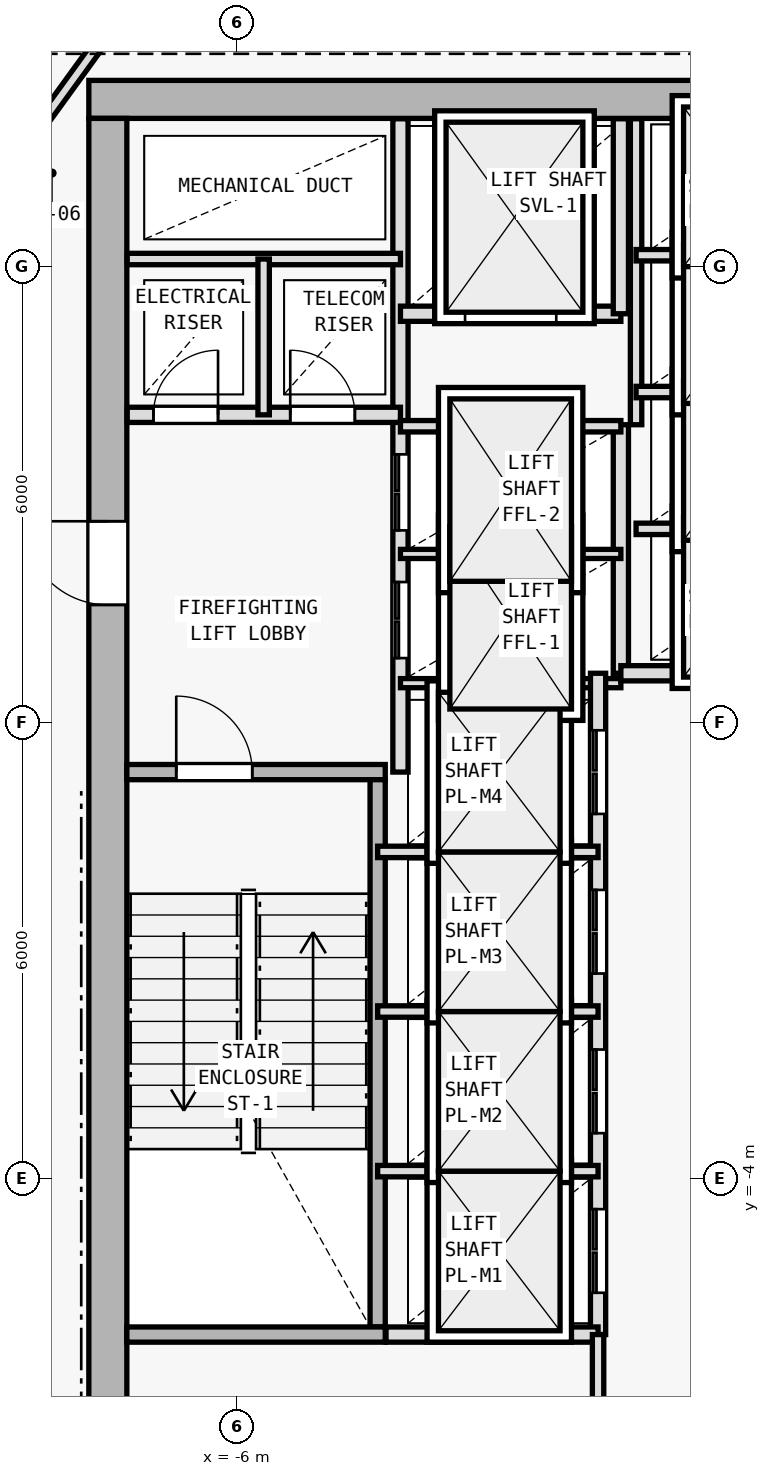
"""IFC4 building model, lengths in metres.
Left out: names, types, materials, properties, quantities, classifications, styles, units other than length and angle.
Written with IfcOpenShell. Run it as: python <this file> out.ifc"""

import sys

from ifc_helpers import new_model, si_unit, direction, frame, frame_2d, origin, origin_2d, place, context, subcontext, project, spatial, rectangle, i_section, extrude, element, fill, save


model = new_model("IFC4")
c1 = context("Model", 3, precision=1e-05, world=origin(), true_north=direction((0.0, 1.0)))
c2 = subcontext(c1, "Body", "Model", "MODEL_VIEW")
j1 = project(units=[si_unit("LENGTHUNIT", "METRE"), si_unit("PLANEANGLEUNIT", "RADIAN")], contexts=[c1])
p1 = place(None, origin())
s1 = spatial("IfcSite", under=j1, at=p1, CompositionType="ELEMENT")
p2 = place(p1, origin())
s2 = spatial("IfcBuilding", under=s1, at=p2, CompositionType="ELEMENT")
p3 = place(p2, frame((0.0, 0.0, 190.2)))
s3 = spatial("IfcBuildingStorey", under=s2, at=p3, CompositionType="ELEMENT", Elevation=190.2)
for number, where, z_axis, x_axis in (
    (1, (-7.7, 10.2, 0.0), (0.0, 0.0, 1.0), (1.0, 0.0, 0.0)),
    (2, (-7.7, 2.0, 0.0), (0.0, 0.0, 1.0), (1.0, 0.0, 0.0)),
):
    element("IfcColumn", number, at=place(p3, frame(where, z_axis=z_axis, x_axis=x_axis)), inside=s3, PredefinedType="COLUMN", context=c2, shape_type="SweptSolid", body=[
        extrude(i_section(OverallWidth=0.404, OverallDepth=0.407, WebThickness=0.017, FlangeThickness=0.028, FilletRadius=0.015, at=origin_2d()), origin(), (0.0, 0.0, 1.0), 4.5),
    ])
p4 = place(p3, frame((7.95, 10.2, 0.0), z_axis=(0.0, 0.0, 1.0), x_axis=(-1.0, 0.0, 0.0)))
e3 = element("IfcWall", 3, at=p4, inside=s3, PredefinedType="SHEAR", context=c2, shape_type="SweptSolid", body=[
    extrude(rectangle(XDim=15.9, YDim=0.5, at=frame_2d((7.95, 0.0))), origin(), (0.0, 0.0, 1.0), 4.25),
])
p5 = place(p4, frame((4.4, 0.0, 0.0)))
e4 = element("IfcOpeningElement", 4, at=p5, cuts=e3, PredefinedType="OPENING", context=c2, shape_type="SweptSolid", body=[
    extrude(rectangle(XDim=1.1, YDim=2.15, at=frame_2d((0.55, 1.075))), frame((0.0, 0.26, 0.0), z_axis=(0.0, -1.0, 0.0), x_axis=(1.0, 0.0, 0.0)), (0.0, 0.0, 1.0), 0.52),
])
p6 = place(p3, frame((-7.7, -9.15, 0.0), z_axis=(0.0, 0.0, 1.0), x_axis=(0.0, 1.0, 0.0)))
e5 = element("IfcWall", 5, at=p6, inside=s3, PredefinedType="SHEAR", context=c2, shape_type="SweptSolid", body=[
    extrude(rectangle(XDim=19.1, YDim=0.5, at=frame_2d((9.55, 0.0))), origin(), (0.0, 0.0, 1.0), 4.25),
])
p7 = place(p6, frame((12.7, 0.0, 0.0)))
e6 = element("IfcOpeningElement", 6, at=p7, cuts=e5, PredefinedType="OPENING", context=c2, shape_type="SweptSolid", body=[
    extrude(rectangle(XDim=1.1, YDim=2.15, at=frame_2d((0.55, 1.075))), frame((0.0, 0.26, 0.0), z_axis=(0.0, -1.0, 0.0), x_axis=(1.0, 0.0, 0.0)), (0.0, 0.0, 1.0), 0.52),
])
p8 = place(p3, frame((-7.45, 1.35, 0.0), z_axis=(0.0, 0.0, 1.0), x_axis=(1.0, 0.0, 0.0)))
e7 = element("IfcWall", 7, at=p8, inside=s3, PredefinedType="SOLIDWALL", context=c2, shape_type="SweptSolid", body=[
    extrude(rectangle(XDim=3.4, YDim=0.2, at=frame_2d((1.7, 0.0))), origin(), (0.0, 0.0, 1.0), 4.25),
])
p9 = place(p8, frame((0.65, 0.0, 0.0)))
e8 = element("IfcOpeningElement", 8, at=p9, cuts=e7, PredefinedType="OPENING", context=c2, shape_type="SweptSolid", body=[
    extrude(rectangle(XDim=1.0, YDim=2.15, at=frame_2d((0.5, 1.075))), frame((0.0, 0.11, 0.0), z_axis=(0.0, -1.0, 0.0), x_axis=(1.0, 0.0, 0.0)), (0.0, 0.0, 1.0), 0.22),
])
p10 = place(p3, frame((-4.15, -5.95, 0.0), z_axis=(0.0, 0.0, 1.0), x_axis=(0.0, 1.0, 0.0)))
e9 = element("IfcWall", 9, at=p10, inside=s3, PredefinedType="SOLIDWALL", context=c2, shape_type="SweptSolid", body=[
    extrude(rectangle(XDim=7.2, YDim=0.2, at=frame_2d((3.6, 0.0))), origin(), (0.0, 0.0, 1.0), 4.25),
])
p11 = place(p3, frame((-3.85, 1.35, 0.0), z_axis=(0.0, 0.0, 1.0), x_axis=(0.0, 1.0, 0.0)))
e10 = element("IfcWall", 10, at=p11, inside=s3, PredefinedType="SOLIDWALL", context=c2, shape_type="SweptSolid", body=[
    extrude(rectangle(XDim=8.595, YDim=0.2, at=frame_2d((4.297, 0.0))), origin(), (0.0, 0.0, 1.0), 4.25),
])
p12 = place(p11, frame((1.5, 0.0, 0.0)))
e11 = element("IfcOpeningElement", 11, at=p12, cuts=e10, PredefinedType="OPENING", context=c2, shape_type="SweptSolid", body=[
    extrude(rectangle(XDim=1.0, YDim=2.15, at=frame_2d((0.5, 1.075))), frame((0.0, 0.11, 0.0), z_axis=(0.0, -1.0, 0.0), x_axis=(1.0, 0.0, 0.0)), (0.0, 0.0, 1.0), 0.22),
])
p13 = place(p11, frame((3.18, 0.0, 0.0)))
e12 = element("IfcOpeningElement", 12, at=p13, cuts=e10, PredefinedType="OPENING", context=c2, shape_type="SweptSolid", body=[
    extrude(rectangle(XDim=1.0, YDim=2.15, at=frame_2d((0.5, 1.075))), frame((0.0, 0.11, 0.0), z_axis=(0.0, -1.0, 0.0), x_axis=(1.0, 0.0, 0.0)), (0.0, 0.0, 1.0), 0.22),
])
p14 = place(p3, frame((-7.445, 6.05, 0.0), z_axis=(0.0, 0.0, 1.0), x_axis=(1.0, 0.0, 0.0)))
e13 = element("IfcWall", 13, at=p14, inside=s3, PredefinedType="SOLIDWALL", context=c2, shape_type="SweptSolid", body=[
    extrude(rectangle(XDim=3.595, YDim=0.2, at=frame_2d((1.797, 0.0))), origin(), (0.0, 0.0, 1.0), 4.25),
])
p15 = place(p14, frame((0.345, 0.0, 0.0)))
e14 = element("IfcOpeningElement", 14, at=p15, cuts=e13, PredefinedType="OPENING", context=c2, shape_type="SweptSolid", body=[
    extrude(rectangle(XDim=0.85, YDim=2.1, at=frame_2d((0.425, 1.05))), frame((0.0, 0.11, 0.0), z_axis=(0.0, -1.0, 0.0), x_axis=(1.0, 0.0, 0.0)), (0.0, 0.0, 1.0), 0.22),
])
p16 = place(p14, frame((2.145, 0.0, 0.0)))
e15 = element("IfcOpeningElement", 15, at=p16, cuts=e13, PredefinedType="OPENING", context=c2, shape_type="SweptSolid", body=[
    extrude(rectangle(XDim=0.85, YDim=2.1, at=frame_2d((0.425, 1.05))), frame((0.0, 0.11, 0.0), z_axis=(0.0, -1.0, 0.0), x_axis=(1.0, 0.0, 0.0)), (0.0, 0.0, 1.0), 0.22),
])
p17 = place(p3, frame((-7.445, 8.1, 0.0), z_axis=(0.0, 0.0, 1.0), x_axis=(1.0, 0.0, 0.0)))
e16 = element("IfcWall", 16, at=p17, inside=s3, PredefinedType="PARTITIONING", context=c2, shape_type="SweptSolid", body=[
    extrude(rectangle(XDim=3.595, YDim=0.15, at=frame_2d((1.797, 0.0))), origin(), (0.0, 0.0, 1.0), 4.25),
])
p18 = place(p3, frame((-5.65, 6.05, 0.0), z_axis=(0.0, 0.0, 1.0), x_axis=(0.0, 1.0, 0.0)))
e17 = element("IfcWall", 17, at=p18, inside=s3, PredefinedType="PARTITIONING", context=c2, shape_type="SweptSolid", body=[
    extrude(rectangle(XDim=2.05, YDim=0.15, at=frame_2d((1.025, 0.0))), origin(), (0.0, 0.0, 1.0), 4.25),
])
p19 = place(p3, frame((-0.95, 2.65, 0.0), z_axis=(0.0, 0.0, 1.0), x_axis=(0.0, 1.0, 0.0)))
e18 = element("IfcWall", 18, at=p19, inside=s3, PredefinedType="SOLIDWALL", context=c2, shape_type="SweptSolid", body=[
    extrude(rectangle(XDim=3.27, YDim=0.2, at=frame_2d((1.635, 0.0))), origin(), (0.0, 0.0, 1.0), 4.25),
])
for number, where, z_axis, x_axis in (
    (19, (-3.85, 2.52, 0.0), (0.0, 0.0, 1.0), (1.0, 0.0, 0.0)),
    (20, (-3.85, 4.22, 0.0), (0.0, 0.0, 1.0), (1.0, 0.0, 0.0)),
):
    element("IfcWall", number, at=place(p3, frame(where, z_axis=z_axis, x_axis=x_axis)), inside=s3, PredefinedType="PARTITIONING", context=c2, shape_type="SweptSolid", body=[
        extrude(rectangle(XDim=2.9, YDim=0.12, at=frame_2d((1.45, 0.0))), origin(), (0.0, 0.0, 1.0), 4.25),
    ])
p20 = place(p3, frame((-3.85, 5.9, 0.0), z_axis=(0.0, 0.0, 1.0), x_axis=(1.0, 0.0, 0.0)))
e21 = element("IfcWall", 21, at=p20, inside=s3, PredefinedType="PARTITIONING", context=c2, shape_type="SweptSolid", body=[
    extrude(rectangle(XDim=2.9, YDim=0.15, at=frame_2d((1.45, 0.0))), origin(), (0.0, 0.0, 1.0), 4.25),
])
p21 = place(p3, frame((-3.85, 7.38, 0.0), z_axis=(0.0, 0.0, 1.0), x_axis=(1.0, 0.0, 0.0)))
e22 = element("IfcWall", 22, at=p21, inside=s3, PredefinedType="SOLIDWALL", context=c2, shape_type="SweptSolid", body=[
    extrude(rectangle(XDim=2.9, YDim=0.2, at=frame_2d((1.45, 0.0))), origin(), (0.0, 0.0, 1.0), 4.25),
])
p22 = place(p21, frame((0.85, 0.0, 0.0)))
e23 = element("IfcOpeningElement", 23, at=p22, cuts=e22, PredefinedType="OPENING", context=c2, shape_type="SweptSolid", body=[
    extrude(rectangle(XDim=1.2, YDim=2.2, at=frame_2d((0.6, 1.1))), frame((0.0, 0.11, 0.0), z_axis=(0.0, -1.0, 0.0), x_axis=(1.0, 0.0, 0.0)), (0.0, 0.0, 1.0), 0.22),
])
p23 = place(p3, frame((-0.95, 7.38, 0.0), z_axis=(0.0, 0.0, 1.0), x_axis=(0.0, 1.0, 0.0)))
e24 = element("IfcWall", 24, at=p23, inside=s3, PredefinedType="SOLIDWALL", context=c2, shape_type="SweptSolid", body=[
    extrude(rectangle(XDim=2.565, YDim=0.2, at=frame_2d((1.283, 0.0))), origin(), (0.0, 0.0, 1.0), 4.25),
])
p24 = place(p3, frame((-1.25, -6.05, 0.0), z_axis=(0.0, 0.0, 1.0), x_axis=(0.0, 1.0, 0.0)))
e25 = element("IfcWall", 25, at=p24, inside=s3, PredefinedType="SOLIDWALL", context=c2, shape_type="SweptSolid", body=[
    extrude(rectangle(XDim=8.7, YDim=0.2, at=frame_2d((4.35, 0.0))), origin(), (0.0, 0.0, 1.0), 4.25),
])
p25 = place(p24, frame((0.55, 0.0, 0.0)))
e26 = element("IfcOpeningElement", 26, at=p25, cuts=e25, PredefinedType="OPENING", context=c2, shape_type="SweptSolid", body=[
    extrude(rectangle(XDim=1.1, YDim=2.15, at=frame_2d((0.55, 1.075))), frame((0.0, 0.11, 0.0), z_axis=(0.0, -1.0, 0.0), x_axis=(1.0, 0.0, 0.0)), (0.0, 0.0, 1.0), 0.22),
])
p26 = place(p24, frame((2.65, 0.0, 0.0)))
e27 = element("IfcOpeningElement", 27, at=p26, cuts=e25, PredefinedType="OPENING", context=c2, shape_type="SweptSolid", body=[
    extrude(rectangle(XDim=1.1, YDim=2.15, at=frame_2d((0.55, 1.075))), frame((0.0, 0.11, 0.0), z_axis=(0.0, -1.0, 0.0), x_axis=(1.0, 0.0, 0.0)), (0.0, 0.0, 1.0), 0.22),
])
p27 = place(p24, frame((4.75, 0.0, 0.0)))
e28 = element("IfcOpeningElement", 28, at=p27, cuts=e25, PredefinedType="OPENING", context=c2, shape_type="SweptSolid", body=[
    extrude(rectangle(XDim=1.1, YDim=2.15, at=frame_2d((0.55, 1.075))), frame((0.0, 0.11, 0.0), z_axis=(0.0, -1.0, 0.0), x_axis=(1.0, 0.0, 0.0)), (0.0, 0.0, 1.0), 0.22),
])
p28 = place(p24, frame((6.85, 0.0, 0.0)))
e29 = element("IfcOpeningElement", 29, at=p28, cuts=e25, PredefinedType="OPENING", context=c2, shape_type="SweptSolid", body=[
    extrude(rectangle(XDim=1.1, YDim=2.15, at=frame_2d((0.55, 1.075))), frame((0.0, 0.11, 0.0), z_axis=(0.0, -1.0, 0.0), x_axis=(1.0, 0.0, 0.0)), (0.0, 0.0, 1.0), 0.22),
])
for number, where, z_axis, x_axis in (
    (30, (-4.15, -3.9, 0.0), (0.0, 0.0, 1.0), (1.0, 0.0, 0.0)),
    (31, (-4.15, -1.8, 0.0), (0.0, 0.0, 1.0), (1.0, 0.0, 0.0)),
    (32, (-4.15, 0.3, 0.0), (0.0, 0.0, 1.0), (1.0, 0.0, 0.0)),
):
    element("IfcWall", number, at=place(p3, frame(where, z_axis=z_axis, x_axis=x_axis)), inside=s3, PredefinedType="PARTITIONING", context=c2, shape_type="SweptSolid", body=[
        extrude(rectangle(XDim=2.9, YDim=0.15, at=frame_2d((1.45, 0.0))), origin(), (0.0, 0.0, 1.0), 4.25),
    ])
p29 = place(p3, frame((-0.95, 2.65, 0.0), z_axis=(0.0, 0.0, 1.0), x_axis=(1.0, 0.0, 0.0)))
e33 = element("IfcWall", 33, at=p29, inside=s3, PredefinedType="SOLIDWALL", context=c2, shape_type="SweptSolid", body=[
    extrude(rectangle(XDim=2.9, YDim=0.2, at=frame_2d((1.45, 0.0))), origin(), (0.0, 0.0, 1.0), 4.25),
])
p30 = place(p3, frame((-0.75, 5.92, 0.0), z_axis=(0.0, 0.0, 1.0), x_axis=(0.0, 1.0, 0.0)))
e34 = element("IfcWall", 34, at=p30, inside=s3, PredefinedType="PARTITIONING", context=c2, shape_type="SweptSolid", body=[
    extrude(rectangle(XDim=4.025, YDim=0.15, at=frame_2d((2.013, 0.0))), origin(), (0.0, 0.0, 1.0), 4.25),
])
for number, where, z_axis, x_axis in (
    (35, (-0.75, 4.55, 0.0), (0.0, 0.0, 1.0), (1.0, 0.0, 0.0)),
    (36, (-0.75, 6.35, 0.0), (0.0, 0.0, 1.0), (1.0, 0.0, 0.0)),
    (37, (-0.75, 8.15, 0.0), (0.0, 0.0, 1.0), (1.0, 0.0, 0.0)),
):
    element("IfcWall", number, at=place(p3, frame(where, z_axis=z_axis, x_axis=x_axis)), inside=s3, PredefinedType="PARTITIONING", context=c2, shape_type="SweptSolid", body=[
        extrude(rectangle(XDim=2.7, YDim=0.15, at=frame_2d((1.35, 0.0))), origin(), (0.0, 0.0, 1.0), 4.25),
    ])
p31 = place(p3, frame((-7.45, -6.05, 0.0), z_axis=(0.0, 0.0, 1.0), x_axis=(1.0, 0.0, 0.0)))
e38 = element("IfcWall", 38, at=p31, inside=s3, PredefinedType="SOLIDWALL", context=c2, shape_type="SweptSolid", body=[
    extrude(rectangle(XDim=3.4, YDim=0.2, at=frame_2d((1.7, 0.0))), origin(), (0.0, 0.0, 1.0), 4.25),
])
p32 = place(p3, frame((-4.04, -6.05, 0.0), z_axis=(0.0, 0.0, 1.0), x_axis=(1.0, 0.0, 0.0)))
e39 = element("IfcWall", 39, at=p32, inside=s3, PredefinedType="SOLIDWALL", context=c2, shape_type="SweptSolid", body=[
    extrude(rectangle(XDim=2.79, YDim=0.2, at=frame_2d((1.395, 0.0))), origin(), (0.0, 0.0, 1.0), 4.25),
])
p33 = place(p3, frame((-1.25, -9.145, 0.0), z_axis=(0.0, 0.0, 1.0), x_axis=(0.0, 1.0, 0.0)))
e40 = element("IfcWall", 40, at=p33, inside=s3, PredefinedType="PARTITIONING", context=c2, shape_type="SweptSolid", body=[
    extrude(rectangle(XDim=3.095, YDim=0.15, at=frame_2d((1.547, 0.0))), origin(), (0.0, 0.0, 1.0), 4.25),
])
p34 = place(p33, frame((0.845, 0.0, 0.0)))
e41 = element("IfcOpeningElement", 41, at=p34, cuts=e40, PredefinedType="OPENING", context=c2, shape_type="SweptSolid", body=[
    extrude(rectangle(XDim=0.95, YDim=2.1, at=frame_2d((0.475, 1.05))), frame((0.0, 0.085, 0.0), z_axis=(0.0, -1.0, 0.0), x_axis=(1.0, 0.0, 0.0)), (0.0, 0.0, 1.0), 0.17),
])
p35 = place(p3, frame((-9.78, 8.226, 0.0), z_axis=(0.0, 0.0, 1.0), x_axis=(0.586956386413, 0.809618552436, 0.0)))
e42 = element("IfcWall", 42, at=p35, inside=s3, PredefinedType="PARTITIONING", context=c2, shape_type="SweptSolid", body=[
    extrude(rectangle(XDim=5.008, YDim=0.15, at=frame_2d((2.504, 0.0))), origin(), (0.0, 0.0, 1.0), 3.905),
])
p36 = place(p35, frame((1.154, 0.0, 0.0)))
e43 = element("IfcOpeningElement", 43, at=p36, cuts=e42, PredefinedType="OPENING", context=c2, shape_type="SweptSolid", body=[
    extrude(rectangle(XDim=0.9, YDim=2.1, at=frame_2d((0.45, 1.05))), frame((0.0, 0.085, 0.0), z_axis=(0.0, -1.0, 0.0), x_axis=(1.0, 0.0, 0.0)), (0.0, 0.0, 1.0), 0.17),
])
p37 = place(p7, origin())
e44 = element("IfcDoor", 44, at=p37, inside=s3, OperationType="SINGLE_SWING_RIGHT", PredefinedType="DOOR", context=c2, shape_type="SweptSolid", body=[
    extrude(rectangle(XDim=1.1, YDim=2.15, at=frame_2d((0.55, 1.075))), frame((0.0, 0.025, 0.0), z_axis=(0.0, -1.0, 0.0), x_axis=(1.0, 0.0, 0.0)), (0.0, 0.0, 1.0), 0.05),
])
fill(e6, e44)
p38 = place(p9, origin())
e45 = element("IfcDoor", 45, at=p38, inside=s3, OperationType="SINGLE_SWING_LEFT", PredefinedType="DOOR", context=c2, shape_type="SweptSolid", body=[
    extrude(rectangle(XDim=1.0, YDim=2.15, at=frame_2d((0.5, 1.075))), frame((0.0, 0.025, 0.0), z_axis=(0.0, -1.0, 0.0), x_axis=(1.0, 0.0, 0.0)), (0.0, 0.0, 1.0), 0.05),
])
fill(e8, e45)
p39 = place(p15, origin())
e46 = element("IfcDoor", 46, at=p39, inside=s3, OperationType="SINGLE_SWING_RIGHT", PredefinedType="DOOR", context=c2, shape_type="SweptSolid", body=[
    extrude(rectangle(XDim=0.85, YDim=2.1, at=frame_2d((0.425, 1.05))), frame((0.0, 0.025, 0.0), z_axis=(0.0, -1.0, 0.0), x_axis=(1.0, 0.0, 0.0)), (0.0, 0.0, 1.0), 0.05),
])
fill(e14, e46)
p40 = place(p16, origin())
e47 = element("IfcDoor", 47, at=p40, inside=s3, OperationType="SINGLE_SWING_LEFT", PredefinedType="DOOR", context=c2, shape_type="SweptSolid", body=[
    extrude(rectangle(XDim=0.85, YDim=2.1, at=frame_2d((0.425, 1.05))), frame((0.0, 0.025, 0.0), z_axis=(0.0, -1.0, 0.0), x_axis=(1.0, 0.0, 0.0)), (0.0, 0.0, 1.0), 0.05),
])
fill(e15, e47)
p41 = place(p22, origin())
e48 = element("IfcDoor", 48, at=p41, inside=s3, OperationType="DOUBLE_DOOR_SLIDING", PredefinedType="DOOR", context=c2, shape_type="SweptSolid", body=[
    extrude(rectangle(XDim=1.2, YDim=2.2, at=frame_2d((0.6, 1.1))), frame((0.0, 0.025, 0.0), z_axis=(0.0, -1.0, 0.0), x_axis=(1.0, 0.0, 0.0)), (0.0, 0.0, 1.0), 0.05),
])
fill(e23, e48)
p42 = place(p25, origin())
e49 = element("IfcDoor", 49, at=p42, inside=s3, OperationType="DOUBLE_DOOR_SLIDING", PredefinedType="DOOR", context=c2, shape_type="SweptSolid", body=[
    extrude(rectangle(XDim=1.1, YDim=2.15, at=frame_2d((0.55, 1.075))), frame((0.0, 0.025, 0.0), z_axis=(0.0, -1.0, 0.0), x_axis=(1.0, 0.0, 0.0)), (0.0, 0.0, 1.0), 0.05),
])
fill(e26, e49)
p43 = place(p26, origin())
e50 = element("IfcDoor", 50, at=p43, inside=s3, OperationType="DOUBLE_DOOR_SLIDING", PredefinedType="DOOR", context=c2, shape_type="SweptSolid", body=[
    extrude(rectangle(XDim=1.1, YDim=2.15, at=frame_2d((0.55, 1.075))), frame((0.0, 0.025, 0.0), z_axis=(0.0, -1.0, 0.0), x_axis=(1.0, 0.0, 0.0)), (0.0, 0.0, 1.0), 0.05),
])
fill(e27, e50)
p44 = place(p27, origin())
e51 = element("IfcDoor", 51, at=p44, inside=s3, OperationType="DOUBLE_DOOR_SLIDING", PredefinedType="DOOR", context=c2, shape_type="SweptSolid", body=[
    extrude(rectangle(XDim=1.1, YDim=2.15, at=frame_2d((0.55, 1.075))), frame((0.0, 0.025, 0.0), z_axis=(0.0, -1.0, 0.0), x_axis=(1.0, 0.0, 0.0)), (0.0, 0.0, 1.0), 0.05),
])
fill(e28, e51)
p45 = place(p28, origin())
e52 = element("IfcDoor", 52, at=p45, inside=s3, OperationType="DOUBLE_DOOR_SLIDING", PredefinedType="DOOR", context=c2, shape_type="SweptSolid", body=[
    extrude(rectangle(XDim=1.1, YDim=2.15, at=frame_2d((0.55, 1.075))), frame((0.0, 0.025, 0.0), z_axis=(0.0, -1.0, 0.0), x_axis=(1.0, 0.0, 0.0)), (0.0, 0.0, 1.0), 0.05),
])
fill(e29, e52)
p46 = place(p12, origin())
e53 = element("IfcDoor", 53, at=p46, inside=s3, OperationType="DOUBLE_DOOR_SLIDING", PredefinedType="DOOR", context=c2, shape_type="SweptSolid", body=[
    extrude(rectangle(XDim=1.0, YDim=2.15, at=frame_2d((0.5, 1.075))), frame((0.0, 0.025, 0.0), z_axis=(0.0, -1.0, 0.0), x_axis=(1.0, 0.0, 0.0)), (0.0, 0.0, 1.0), 0.05),
])
fill(e11, e53)
p47 = place(p13, origin())
e54 = element("IfcDoor", 54, at=p47, inside=s3, OperationType="DOUBLE_DOOR_SLIDING", PredefinedType="DOOR", context=c2, shape_type="SweptSolid", body=[
    extrude(rectangle(XDim=1.0, YDim=2.15, at=frame_2d((0.5, 1.075))), frame((0.0, 0.025, 0.0), z_axis=(0.0, -1.0, 0.0), x_axis=(1.0, 0.0, 0.0)), (0.0, 0.0, 1.0), 0.05),
])
fill(e12, e54)
save(model, sys.argv[1])
